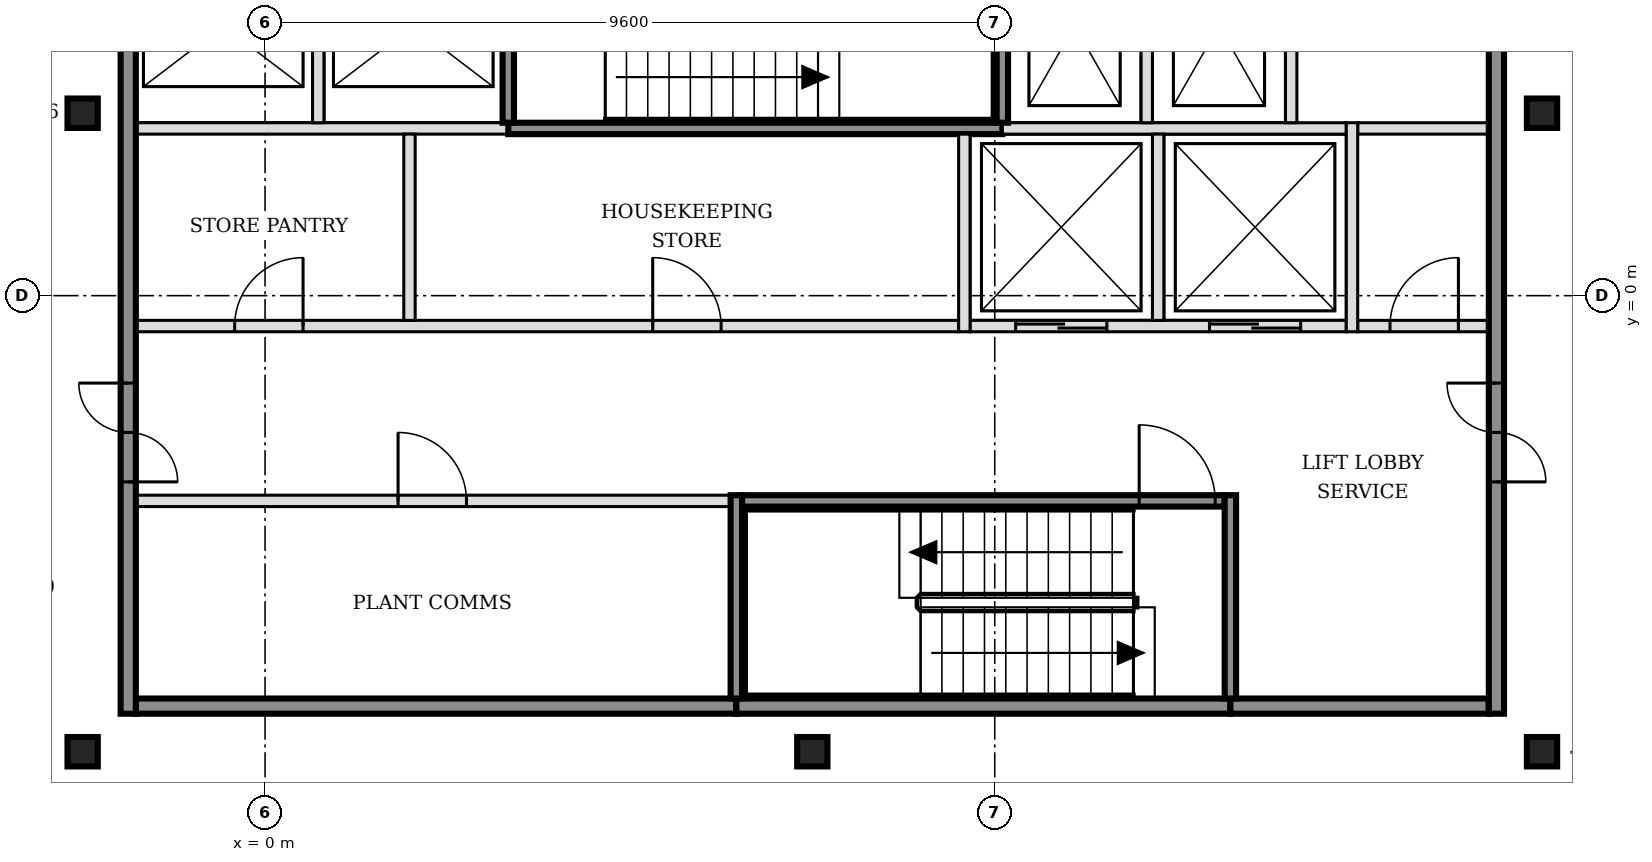
"""IFC4 building model, lengths in metres.
Left out: names, types, materials, properties, quantities, classifications, styles, units other than length and angle.
Written with IfcOpenShell. Run it as: python <this file> out.ifc"""

import sys

from ifc_helpers import new_model, si_unit, direction, frame, frame_2d, origin, origin_2d, place, context, subcontext, project, spatial, rectangle, i_section, extrude, element, fill, save


model = new_model("IFC4")
c1 = context("Model", 3, precision=1e-05, world=origin(), true_north=direction((0.0, 1.0)))
c2 = subcontext(c1, "Body", "Model", "MODEL_VIEW")
j1 = project(units=[si_unit("LENGTHUNIT", "METRE"), si_unit("PLANEANGLEUNIT", "RADIAN")], contexts=[c1])
p1 = place(None, origin())
s1 = spatial("IfcSite", under=j1, at=p1, CompositionType="ELEMENT")
p2 = place(p1, origin())
s2 = spatial("IfcBuilding", under=s1, at=p2, CompositionType="ELEMENT")
p3 = place(p2, frame((0.0, 0.0, 274.2)))
s3 = spatial("IfcBuildingStorey", under=s2, at=p3, CompositionType="ELEMENT", Elevation=274.2)
for number, where, z_axis, x_axis in (
    (1, (-2.4, -6.0, -0.15), (0.0, 0.0, 1.0), (1.0, 0.0, 0.0)),
    (2, (7.2, -6.0, -0.15), (0.0, 0.0, 1.0), (1.0, 0.0, 0.0)),
    (3, (16.8, -6.0, -0.15), (0.0, 0.0, 1.0), (1.0, 0.0, 0.0)),
    (4, (-2.4, 2.4, -0.15), (0.0, 0.0, 1.0), (1.0, 0.0, 0.0)),
    (5, (16.8, 2.4, -0.15), (0.0, 0.0, 1.0), (1.0, 0.0, 0.0)),
):
    element("IfcColumn", number, at=place(p3, frame(where, z_axis=z_axis, x_axis=x_axis)), inside=s3, PredefinedType="COLUMN", context=c2, shape_type="SweptSolid", body=[
        extrude(i_section(OverallWidth=0.398, OverallDepth=0.387, WebThickness=0.021, FlangeThickness=0.033, FilletRadius=0.015, at=origin_2d()), origin(), (0.0, 0.0, 1.0), 3.6),
    ])
p4 = place(p3, frame((-1.7, -5.4, 0.0), z_axis=(0.0, 0.0, 1.0), x_axis=(1.0, 0.0, 0.0)))
e6 = element("IfcWall", 6, at=p4, inside=s3, PredefinedType="SOLIDWALL", context=c2, shape_type="SweptSolid", body=[
    extrude(rectangle(XDim=7.9, YDim=0.2, at=frame_2d((3.95, 0.0))), origin(), (0.0, 0.0, 1.0), 3.45),
])
p5 = place(p3, frame((6.2, -5.4, 0.0), z_axis=(0.0, 0.0, 1.0), x_axis=(1.0, 0.0, 0.0)))
e7 = element("IfcWall", 7, at=p5, inside=s3, PredefinedType="SOLIDWALL", context=c2, shape_type="SweptSolid", body=[
    extrude(rectangle(XDim=6.5, YDim=0.2, at=frame_2d((3.25, 0.0))), origin(), (0.0, 0.0, 1.0), 3.45),
])
p6 = place(p3, frame((12.7, -5.4, 0.0), z_axis=(0.0, 0.0, 1.0), x_axis=(1.0, 0.0, 0.0)))
e8 = element("IfcWall", 8, at=p6, inside=s3, PredefinedType="SOLIDWALL", context=c2, shape_type="SweptSolid", body=[
    extrude(rectangle(XDim=3.4, YDim=0.2, at=frame_2d((1.7, 0.0))), origin(), (0.0, 0.0, 1.0), 3.45),
])
p7 = place(p3, frame((-1.7, -2.7, 0.0), z_axis=(0.0, 0.0, 1.0), x_axis=(1.0, 0.0, 0.0)))
e9 = element("IfcWall", 9, at=p7, inside=s3, PredefinedType="PARTITIONING", context=c2, shape_type="SweptSolid", body=[
    extrude(rectangle(XDim=7.825, YDim=0.15, at=frame_2d((3.913, 0.0))), origin(), (0.0, 0.0, 1.0), 3.45),
])
p8 = place(p7, frame((3.45, 0.0, 0.0)))
e10 = element("IfcOpeningElement", 10, at=p8, cuts=e9, PredefinedType="OPENING", context=c2, shape_type="SweptSolid", body=[
    extrude(rectangle(XDim=0.9, YDim=2.1, at=frame_2d((0.45, 1.05))), frame((0.0, 0.085, 0.0), z_axis=(0.0, -1.0, 0.0), x_axis=(1.0, 0.0, 0.0)), (0.0, 0.0, 1.0), 0.17),
])
p9 = place(p3, frame((6.275, -2.7, 0.0), z_axis=(0.0, 0.0, 1.0), x_axis=(1.0, 0.0, 0.0)))
e11 = element("IfcWall", 11, at=p9, inside=s3, PredefinedType="SOLIDWALL", context=c2, shape_type="SweptSolid", body=[
    extrude(rectangle(XDim=6.35, YDim=0.15, at=frame_2d((3.175, 0.0))), origin(), (0.0, 0.0, 1.0), 3.45),
])
p10 = place(p9, frame((5.225, 0.0, 0.0)))
e12 = element("IfcOpeningElement", 12, at=p10, cuts=e11, PredefinedType="OPENING", context=c2, shape_type="SweptSolid", body=[
    extrude(rectangle(XDim=1.0, YDim=2.1, at=frame_2d((0.5, 1.05))), frame((0.0, 0.085, 0.0), z_axis=(0.0, -1.0, 0.0), x_axis=(1.0, 0.0, 0.0)), (0.0, 0.0, 1.0), 0.17),
])
p11 = place(p3, frame((-1.7, -0.4, 0.0), z_axis=(0.0, 0.0, 1.0), x_axis=(1.0, 0.0, 0.0)))
e13 = element("IfcWall", 13, at=p11, inside=s3, PredefinedType="PARTITIONING", context=c2, shape_type="SweptSolid", body=[
    extrude(rectangle(XDim=10.825, YDim=0.15, at=frame_2d((5.413, 0.0))), origin(), (0.0, 0.0, 1.0), 3.45),
])
p12 = place(p11, frame((1.3, 0.0, 0.0)))
e14 = element("IfcOpeningElement", 14, at=p12, cuts=e13, PredefinedType="OPENING", context=c2, shape_type="SweptSolid", body=[
    extrude(rectangle(XDim=0.9, YDim=2.1, at=frame_2d((0.45, 1.05))), frame((0.0, 0.085, 0.0), z_axis=(0.0, -1.0, 0.0), x_axis=(1.0, 0.0, 0.0)), (0.0, 0.0, 1.0), 0.17),
])
p13 = place(p11, frame((6.8, 0.0, 0.0)))
e15 = element("IfcOpeningElement", 15, at=p13, cuts=e13, PredefinedType="OPENING", context=c2, shape_type="SweptSolid", body=[
    extrude(rectangle(XDim=0.9, YDim=2.1, at=frame_2d((0.45, 1.05))), frame((0.0, 0.085, 0.0), z_axis=(0.0, -1.0, 0.0), x_axis=(1.0, 0.0, 0.0)), (0.0, 0.0, 1.0), 0.17),
])
p14 = place(p3, frame((9.275, -0.4, 0.0), z_axis=(0.0, 0.0, 1.0), x_axis=(1.0, 0.0, 0.0)))
e16 = element("IfcWall", 16, at=p14, inside=s3, PredefinedType="SOLIDWALL", context=c2, shape_type="SweptSolid", body=[
    extrude(rectangle(XDim=4.95, YDim=0.15, at=frame_2d((2.475, 0.0))), origin(), (0.0, 0.0, 1.0), 3.45),
])
p15 = place(p14, frame((0.6, 0.0, 0.0)))
e17 = element("IfcOpeningElement", 17, at=p15, cuts=e16, PredefinedType="OPENING", context=c2, shape_type="SweptSolid", body=[
    extrude(rectangle(XDim=1.2, YDim=2.1, at=frame_2d((0.6, 1.05))), frame((0.0, 0.085, 0.0), z_axis=(0.0, -1.0, 0.0), x_axis=(1.0, 0.0, 0.0)), (0.0, 0.0, 1.0), 0.17),
])
p16 = place(p14, frame((3.15, 0.0, 0.0)))
e18 = element("IfcOpeningElement", 18, at=p16, cuts=e16, PredefinedType="OPENING", context=c2, shape_type="SweptSolid", body=[
    extrude(rectangle(XDim=1.2, YDim=2.1, at=frame_2d((0.6, 1.05))), frame((0.0, 0.085, 0.0), z_axis=(0.0, -1.0, 0.0), x_axis=(1.0, 0.0, 0.0)), (0.0, 0.0, 1.0), 0.17),
])
p17 = place(p3, frame((14.375, -0.4, 0.0), z_axis=(0.0, 0.0, 1.0), x_axis=(1.0, 0.0, 0.0)))
e19 = element("IfcWall", 19, at=p17, inside=s3, PredefinedType="PARTITIONING", context=c2, shape_type="SweptSolid", body=[
    extrude(rectangle(XDim=1.725, YDim=0.15, at=frame_2d((0.863, 0.0))), origin(), (0.0, 0.0, 1.0), 3.45),
])
p18 = place(p17, frame((0.425, 0.0, 0.0)))
e20 = element("IfcOpeningElement", 20, at=p18, cuts=e19, PredefinedType="OPENING", context=c2, shape_type="SweptSolid", body=[
    extrude(rectangle(XDim=0.9, YDim=2.1, at=frame_2d((0.45, 1.05))), frame((0.0, 0.085, 0.0), z_axis=(0.0, -1.0, 0.0), x_axis=(1.0, 0.0, 0.0)), (0.0, 0.0, 1.0), 0.17),
])
p19 = place(p3, frame((-1.7, 2.2, 0.0), z_axis=(0.0, 0.0, 1.0), x_axis=(1.0, 0.0, 0.0)))
e21 = element("IfcWall", 21, at=p19, inside=s3, PredefinedType="SOLIDWALL", context=c2, shape_type="SweptSolid", body=[
    extrude(rectangle(XDim=4.9, YDim=0.15, at=frame_2d((2.45, 0.0))), origin(), (0.0, 0.0, 1.0), 3.45),
])
p20 = place(p3, frame((3.2, 2.2, 0.0), z_axis=(0.0, 0.0, 1.0), x_axis=(1.0, 0.0, 0.0)))
e22 = element("IfcWall", 22, at=p20, inside=s3, PredefinedType="SOLIDWALL", context=c2, shape_type="SweptSolid", body=[
    extrude(rectangle(XDim=6.5, YDim=0.15, at=frame_2d((3.25, 0.0))), origin(), (0.0, 0.0, 1.0), 3.45),
])
p21 = place(p3, frame((9.7, 2.2, 0.0), z_axis=(0.0, 0.0, 1.0), x_axis=(1.0, 0.0, 0.0)))
e23 = element("IfcWall", 23, at=p21, inside=s3, PredefinedType="SOLIDWALL", context=c2, shape_type="SweptSolid", body=[
    extrude(rectangle(XDim=4.525, YDim=0.15, at=frame_2d((2.263, 0.0))), origin(), (0.0, 0.0, 1.0), 3.45),
])
p22 = place(p3, frame((14.375, 2.2, 0.0), z_axis=(0.0, 0.0, 1.0), x_axis=(1.0, 0.0, 0.0)))
e24 = element("IfcWall", 24, at=p22, inside=s3, PredefinedType="PARTITIONING", context=c2, shape_type="SweptSolid", body=[
    extrude(rectangle(XDim=1.725, YDim=0.15, at=frame_2d((0.863, 0.0))), origin(), (0.0, 0.0, 1.0), 3.45),
])
p23 = place(p3, frame((-1.8, -5.5, 0.0), z_axis=(0.0, 0.0, 1.0), x_axis=(0.0, 1.0, 0.0)))
e25 = element("IfcWall", 25, at=p23, inside=s3, PredefinedType="SOLIDWALL", context=c2, shape_type="SweptSolid", body=[
    extrude(rectangle(XDim=15.8, YDim=0.2, at=frame_2d((7.9, 0.0))), origin(), (0.0, 0.0, 1.0), 3.45),
])
p24 = place(p23, frame((3.05, 0.0, 0.0)))
e26 = element("IfcOpeningElement", 26, at=p24, cuts=e25, PredefinedType="OPENING", context=c2, shape_type="SweptSolid", body=[
    extrude(rectangle(XDim=1.3, YDim=2.1, at=frame_2d((0.65, 1.05))), frame((0.0, 0.11, 0.0), z_axis=(0.0, -1.0, 0.0), x_axis=(1.0, 0.0, 0.0)), (0.0, 0.0, 1.0), 0.22),
])
p25 = place(p23, frame((11.45, 0.0, 0.0)))
e27 = element("IfcOpeningElement", 27, at=p25, cuts=e25, PredefinedType="OPENING", context=c2, shape_type="SweptSolid", body=[
    extrude(rectangle(XDim=1.3, YDim=2.1, at=frame_2d((0.65, 1.05))), frame((0.0, 0.11, 0.0), z_axis=(0.0, -1.0, 0.0), x_axis=(1.0, 0.0, 0.0)), (0.0, 0.0, 1.0), 0.22),
])
p26 = place(p3, frame((0.7, 2.275, 0.0), z_axis=(0.0, 0.0, 1.0), x_axis=(0.0, 1.0, 0.0)))
e28 = element("IfcWall", 28, at=p26, inside=s3, PredefinedType="SOLIDWALL", context=c2, shape_type="SweptSolid", body=[
    extrude(rectangle(XDim=2.55, YDim=0.15, at=frame_2d((1.275, 0.0))), origin(), (0.0, 0.0, 1.0), 3.45),
])
p27 = place(p3, frame((1.9, -0.325, 0.0), z_axis=(0.0, 0.0, 1.0), x_axis=(0.0, 1.0, 0.0)))
e29 = element("IfcWall", 29, at=p27, inside=s3, PredefinedType="PARTITIONING", context=c2, shape_type="SweptSolid", body=[
    extrude(rectangle(XDim=2.45, YDim=0.15, at=frame_2d((1.225, 0.0))), origin(), (0.0, 0.0, 1.0), 3.45),
])
p28 = place(p3, frame((3.2, 2.275, 0.0), z_axis=(0.0, 0.0, 1.0), x_axis=(0.0, 1.0, 0.0)))
e30 = element("IfcWall", 30, at=p28, inside=s3, PredefinedType="SOLIDWALL", context=c2, shape_type="SweptSolid", body=[
    extrude(rectangle(XDim=2.55, YDim=0.15, at=frame_2d((1.275, 0.0))), origin(), (0.0, 0.0, 1.0), 3.45),
])
p29 = place(p3, frame((6.2, -5.3, 0.0), z_axis=(0.0, 0.0, 1.0), x_axis=(0.0, 1.0, 0.0)))
e31 = element("IfcWall", 31, at=p29, inside=s3, PredefinedType="SOLIDWALL", context=c2, shape_type="SweptSolid", body=[
    extrude(rectangle(XDim=2.675, YDim=0.15, at=frame_2d((1.337, 0.0))), origin(), (0.0, 0.0, 1.0), 3.45),
])
p30 = place(p3, frame((9.2, -0.475, 0.0), z_axis=(0.0, 0.0, 1.0), x_axis=(0.0, 1.0, 0.0)))
e32 = element("IfcWall", 32, at=p30, inside=s3, PredefinedType="SOLIDWALL", context=c2, shape_type="SweptSolid", body=[
    extrude(rectangle(XDim=2.6, YDim=0.15, at=frame_2d((1.3, 0.0))), origin(), (0.0, 0.0, 1.0), 3.45),
])
for number, where, z_axis, x_axis in (
    (33, (9.7, 2.275, 0.0), (0.0, 0.0, 1.0), (0.0, 1.0, 0.0)),
    (34, (11.6, 2.275, 0.0), (0.0, 0.0, 1.0), (0.0, 1.0, 0.0)),
):
    element("IfcWall", number, at=place(p3, frame(where, z_axis=z_axis, x_axis=x_axis)), inside=s3, PredefinedType="SOLIDWALL", context=c2, shape_type="SweptSolid", body=[
        extrude(rectangle(XDim=2.55, YDim=0.15, at=frame_2d((1.275, 0.0))), origin(), (0.0, 0.0, 1.0), 3.45),
    ])
p31 = place(p3, frame((11.75, -0.325, 0.0), z_axis=(0.0, 0.0, 1.0), x_axis=(0.0, 1.0, 0.0)))
e35 = element("IfcWall", 35, at=p31, inside=s3, PredefinedType="SOLIDWALL", context=c2, shape_type="SweptSolid", body=[
    extrude(rectangle(XDim=2.45, YDim=0.15, at=frame_2d((1.225, 0.0))), origin(), (0.0, 0.0, 1.0), 3.45),
])
p32 = place(p3, frame((12.7, -5.3, 0.0), z_axis=(0.0, 0.0, 1.0), x_axis=(0.0, 1.0, 0.0)))
e36 = element("IfcWall", 36, at=p32, inside=s3, PredefinedType="SOLIDWALL", context=c2, shape_type="SweptSolid", body=[
    extrude(rectangle(XDim=2.675, YDim=0.15, at=frame_2d((1.337, 0.0))), origin(), (0.0, 0.0, 1.0), 3.45),
])
p33 = place(p3, frame((13.5, 2.275, 0.0), z_axis=(0.0, 0.0, 1.0), x_axis=(0.0, 1.0, 0.0)))
e37 = element("IfcWall", 37, at=p33, inside=s3, PredefinedType="SOLIDWALL", context=c2, shape_type="SweptSolid", body=[
    extrude(rectangle(XDim=2.55, YDim=0.15, at=frame_2d((1.275, 0.0))), origin(), (0.0, 0.0, 1.0), 3.45),
])
p34 = place(p3, frame((14.3, -0.475, 0.0), z_axis=(0.0, 0.0, 1.0), x_axis=(0.0, 1.0, 0.0)))
e38 = element("IfcWall", 38, at=p34, inside=s3, PredefinedType="SOLIDWALL", context=c2, shape_type="SweptSolid", body=[
    extrude(rectangle(XDim=2.75, YDim=0.15, at=frame_2d((1.375, 0.0))), origin(), (0.0, 0.0, 1.0), 3.45),
])
p35 = place(p3, frame((16.2, -5.5, 0.0), z_axis=(0.0, 0.0, 1.0), x_axis=(0.0, 1.0, 0.0)))
e39 = element("IfcWall", 39, at=p35, inside=s3, PredefinedType="SOLIDWALL", context=c2, shape_type="SweptSolid", body=[
    extrude(rectangle(XDim=15.8, YDim=0.2, at=frame_2d((7.9, 0.0))), origin(), (0.0, 0.0, 1.0), 3.45),
])
p36 = place(p35, frame((3.05, 0.0, 0.0)))
e40 = element("IfcOpeningElement", 40, at=p36, cuts=e39, PredefinedType="OPENING", context=c2, shape_type="SweptSolid", body=[
    extrude(rectangle(XDim=1.3, YDim=2.1, at=frame_2d((0.65, 1.05))), frame((0.0, 0.11, 0.0), z_axis=(0.0, -1.0, 0.0), x_axis=(1.0, 0.0, 0.0)), (0.0, 0.0, 1.0), 0.22),
])
p37 = place(p35, frame((11.45, 0.0, 0.0)))
e41 = element("IfcOpeningElement", 41, at=p37, cuts=e39, PredefinedType="OPENING", context=c2, shape_type="SweptSolid", body=[
    extrude(rectangle(XDim=1.3, YDim=2.1, at=frame_2d((0.65, 1.05))), frame((0.0, 0.11, 0.0), z_axis=(0.0, -1.0, 0.0), x_axis=(1.0, 0.0, 0.0)), (0.0, 0.0, 1.0), 0.22),
])
p38 = place(p3, frame((13.122, -17.872, 0.0), z_axis=(0.0, 0.0, 1.0), x_axis=(0.707101927234, 0.707111635106, 0.0)))
e42 = element("IfcWall", 42, at=p38, inside=s3, PredefinedType="PARTITIONING", context=c2, shape_type="SweptSolid", body=[
    extrude(rectangle(XDim=25.149, YDim=0.15, at=frame_2d((12.574, 0.0))), origin(), (0.0, 0.0, 1.0), 2.73),
])
p39 = place(p38, frame((4.672, 0.0, 0.0)))
e43 = element("IfcOpeningElement", 43, at=p39, cuts=e42, PredefinedType="OPENING", context=c2, shape_type="SweptSolid", body=[
    extrude(rectangle(XDim=0.9, YDim=2.1, at=frame_2d((0.45, 1.05))), frame((0.0, 0.085, 0.0), z_axis=(0.0, -1.0, 0.0), x_axis=(1.0, 0.0, 0.0)), (0.0, 0.0, 1.0), 0.17),
])
p40 = place(p38, frame((14.284, 0.0, 0.0)))
e44 = element("IfcOpeningElement", 44, at=p40, cuts=e42, PredefinedType="OPENING", context=c2, shape_type="SweptSolid", body=[
    extrude(rectangle(XDim=0.9, YDim=2.1, at=frame_2d((0.45, 1.05))), frame((0.0, 0.085, 0.0), z_axis=(0.0, -1.0, 0.0), x_axis=(1.0, 0.0, 0.0)), (0.0, 0.0, 1.0), 0.17),
])
p41 = place(p38, frame((22.704, 0.0, 0.0)))
e45 = element("IfcOpeningElement", 45, at=p41, cuts=e42, PredefinedType="OPENING", context=c2, shape_type="SweptSolid", body=[
    extrude(rectangle(XDim=0.9, YDim=2.1, at=frame_2d((0.45, 1.05))), frame((0.0, 0.085, 0.0), z_axis=(0.0, -1.0, 0.0), x_axis=(1.0, 0.0, 0.0)), (0.0, 0.0, 1.0), 0.17),
])
p42 = place(p15, origin())
e46 = element("IfcDoor", 46, at=p42, inside=s3, OperationType="DOUBLE_DOOR_SLIDING", PredefinedType="DOOR", context=c2, shape_type="SweptSolid", body=[
    extrude(rectangle(XDim=1.2, YDim=2.1, at=frame_2d((0.6, 1.05))), frame((0.0, 0.025, 0.0), z_axis=(0.0, -1.0, 0.0), x_axis=(1.0, 0.0, 0.0)), (0.0, 0.0, 1.0), 0.05),
])
fill(e17, e46)
p43 = place(p16, origin())
e47 = element("IfcDoor", 47, at=p43, inside=s3, OperationType="DOUBLE_DOOR_SLIDING", PredefinedType="DOOR", context=c2, shape_type="SweptSolid", body=[
    extrude(rectangle(XDim=1.2, YDim=2.1, at=frame_2d((0.6, 1.05))), frame((0.0, 0.025, 0.0), z_axis=(0.0, -1.0, 0.0), x_axis=(1.0, 0.0, 0.0)), (0.0, 0.0, 1.0), 0.05),
])
fill(e18, e47)
p44 = place(p10, origin())
e48 = element("IfcDoor", 48, at=p44, inside=s3, OperationType="SINGLE_SWING_LEFT", PredefinedType="DOOR", context=c2, shape_type="SweptSolid", body=[
    extrude(rectangle(XDim=1.0, YDim=2.1, at=frame_2d((0.5, 1.05))), frame((0.0, 0.025, 0.0), z_axis=(0.0, -1.0, 0.0), x_axis=(1.0, 0.0, 0.0)), (0.0, 0.0, 1.0), 0.05),
])
fill(e12, e48)
p45 = place(p24, origin())
e49 = element("IfcDoor", 49, at=p45, inside=s3, OperationType="DOUBLE_DOOR_SINGLE_SWING", PredefinedType="DOOR", context=c2, shape_type="SweptSolid", body=[
    extrude(rectangle(XDim=1.3, YDim=2.1, at=frame_2d((0.65, 1.05))), frame((0.0, 0.025, 0.0), z_axis=(0.0, -1.0, 0.0), x_axis=(1.0, 0.0, 0.0)), (0.0, 0.0, 1.0), 0.05),
])
fill(e26, e49)
p46 = place(p36, origin())
e50 = element("IfcDoor", 50, at=p46, inside=s3, OperationType="DOUBLE_DOOR_SINGLE_SWING", PredefinedType="DOOR", context=c2, shape_type="SweptSolid", body=[
    extrude(rectangle(XDim=1.3, YDim=2.1, at=frame_2d((0.65, 1.05))), frame((0.0, 0.025, 0.0), z_axis=(0.0, -1.0, 0.0), x_axis=(1.0, 0.0, 0.0)), (0.0, 0.0, 1.0), 0.05),
])
fill(e40, e50)
p47 = place(p18, origin())
e51 = element("IfcDoor", 51, at=p47, inside=s3, OperationType="SINGLE_SWING_RIGHT", PredefinedType="DOOR", context=c2, shape_type="SweptSolid", body=[
    extrude(rectangle(XDim=0.9, YDim=2.1, at=frame_2d((0.45, 1.05))), frame((0.0, 0.025, 0.0), z_axis=(0.0, -1.0, 0.0), x_axis=(1.0, 0.0, 0.0)), (0.0, 0.0, 1.0), 0.05),
])
fill(e20, e51)
p48 = place(p8, origin())
e52 = element("IfcDoor", 52, at=p48, inside=s3, OperationType="SINGLE_SWING_LEFT", PredefinedType="DOOR", context=c2, shape_type="SweptSolid", body=[
    extrude(rectangle(XDim=0.9, YDim=2.1, at=frame_2d((0.45, 1.05))), frame((0.0, 0.025, 0.0), z_axis=(0.0, -1.0, 0.0), x_axis=(1.0, 0.0, 0.0)), (0.0, 0.0, 1.0), 0.05),
])
fill(e10, e52)
p49 = place(p12, origin())
e53 = element("IfcDoor", 53, at=p49, inside=s3, OperationType="SINGLE_SWING_RIGHT", PredefinedType="DOOR", context=c2, shape_type="SweptSolid", body=[
    extrude(rectangle(XDim=0.9, YDim=2.1, at=frame_2d((0.45, 1.05))), frame((0.0, 0.025, 0.0), z_axis=(0.0, -1.0, 0.0), x_axis=(1.0, 0.0, 0.0)), (0.0, 0.0, 1.0), 0.05),
])
fill(e14, e53)
p50 = place(p13, origin())
e54 = element("IfcDoor", 54, at=p50, inside=s3, OperationType="SINGLE_SWING_LEFT", PredefinedType="DOOR", context=c2, shape_type="SweptSolid", body=[
    extrude(rectangle(XDim=0.9, YDim=2.1, at=frame_2d((0.45, 1.05))), frame((0.0, 0.025, 0.0), z_axis=(0.0, -1.0, 0.0), x_axis=(1.0, 0.0, 0.0)), (0.0, 0.0, 1.0), 0.05),
])
fill(e15, e54)
save(model, sys.argv[1])
